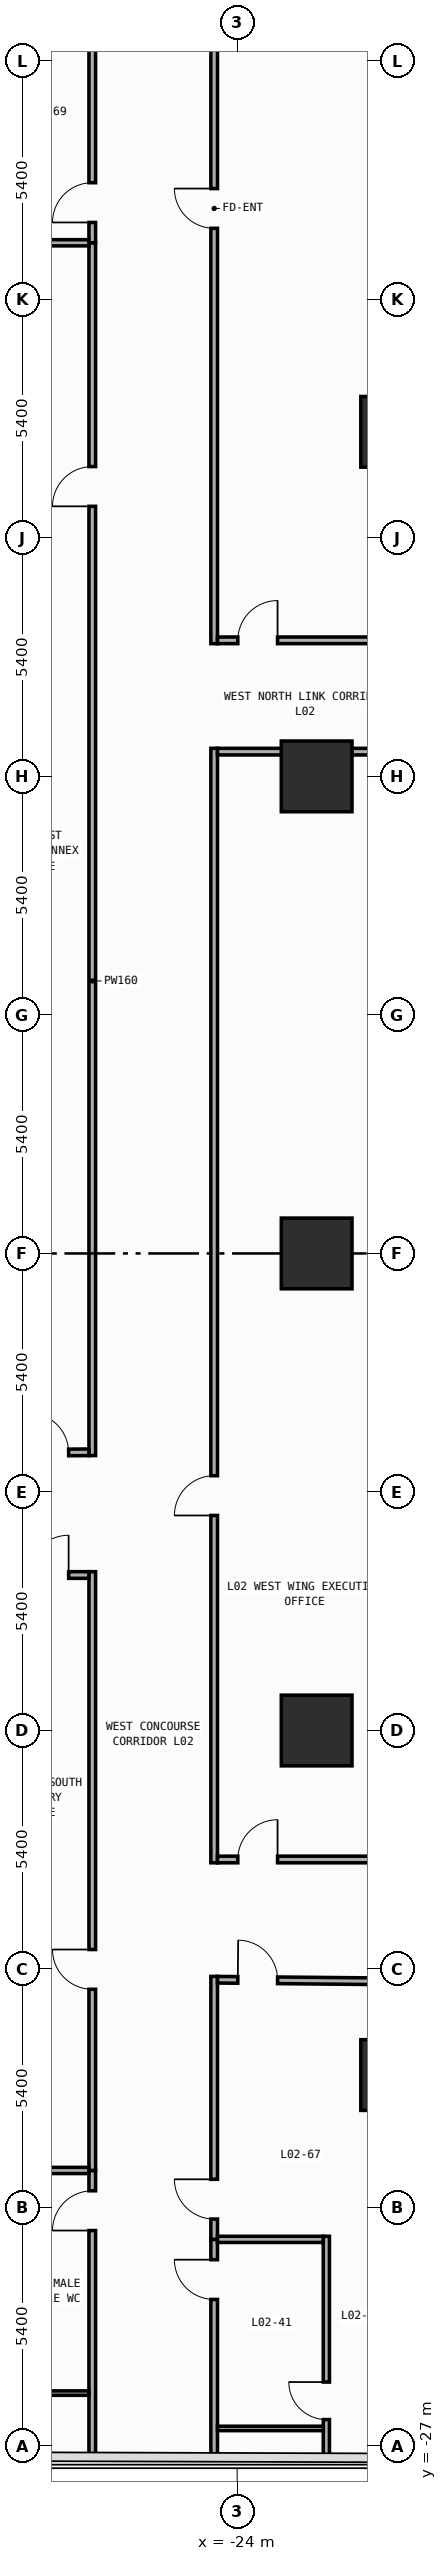
"""IFC4 building model, lengths in metres.
Left out: names, types, materials, properties, quantities, classifications, styles, units other than length and angle.
Written with IfcOpenShell. Run it as: python <this file> out.ifc"""

import sys

from ifc_helpers import new_model, si_unit, direction, frame, frame_2d, origin, origin_2d, place, context, subcontext, project, spatial, rectangle, extrude, element, fill, save


model = new_model("IFC4")
c1 = context("Model", 3, precision=1e-05, world=origin(), true_north=direction((0.0, 1.0)))
c2 = subcontext(c1, "Body", "Model", "MODEL_VIEW")
j1 = project(units=[si_unit("LENGTHUNIT", "METRE"), si_unit("PLANEANGLEUNIT", "RADIAN")], contexts=[c1])
p1 = place(None, origin())
s1 = spatial("IfcSite", under=j1, at=p1, CompositionType="ELEMENT")
p2 = place(p1, origin())
s2 = spatial("IfcBuilding", under=s1, at=p2, CompositionType="ELEMENT")
p3 = place(p2, frame((0.0, 0.0, 6.0)))
s3 = spatial("IfcBuildingStorey", under=s2, at=p3, CompositionType="ELEMENT", Elevation=6.0)
for number, where, z_axis, x_axis in (
    (1, (-20.4, -18.6, 0.0), (0.0, 0.0, 1.0), (1.0, 0.0, 0.0)),
    (2, (-20.4, 18.6, 0.0), (0.0, 0.0, 1.0), (1.0, 0.0, 0.0)),
    (3, (-22.2, -10.8, 0.0), (0.0, 0.0, 1.0), (1.0, 0.0, 0.0)),
    (4, (-22.2, 0.0, 0.0), (0.0, 0.0, 1.0), (1.0, 0.0, 0.0)),
    (5, (-22.2, 10.8, 0.0), (0.0, 0.0, 1.0), (1.0, 0.0, 0.0)),
):
    element("IfcColumn", number, at=place(p3, frame(where, z_axis=z_axis, x_axis=x_axis)), inside=s3, PredefinedType="COLUMN", context=c2, shape_type="SweptSolid", body=[
        extrude(rectangle(XDim=1.6, YDim=1.6, at=origin_2d()), origin(), (0.0, 0.0, 1.0), 5.0),
    ])
p4 = place(p3, frame((-24.52, 13.805, 0.0), z_axis=(0.0, 0.0, 1.0), x_axis=(0.0, 1.0, 0.0)))
e6 = element("IfcWall", 6, at=p4, inside=s3, PredefinedType="PARTITIONING", context=c2, shape_type="SweptSolid", body=[
    extrude(rectangle(XDim=13.608, YDim=0.15, at=frame_2d((6.804, 0.0))), origin(), (0.0, 0.0, 1.0), 4.7),
])
p5 = place(p4, frame((9.402, 0.0, 0.0)))
e7 = element("IfcOpeningElement", 7, at=p5, cuts=e6, PredefinedType="OPENING", context=c2, shape_type="SweptSolid", body=[
    extrude(rectangle(XDim=0.9, YDim=2.15, at=frame_2d((0.45, 1.075))), frame((0.0, 0.085, 0.0), z_axis=(0.0, -1.0, 0.0), x_axis=(1.0, 0.0, 0.0)), (0.0, 0.0, 1.0), 0.17),
])
p6 = place(p3, frame((-27.28, -27.249, 0.0), z_axis=(0.0, 0.0, 1.0), x_axis=(0.0, 1.0, 0.0)))
e8 = element("IfcWall", 8, at=p6, inside=s3, PredefinedType="PARTITIONING", context=c2, shape_type="SweptSolid", body=[
    extrude(rectangle(XDim=6.489, YDim=0.15, at=frame_2d((3.245, 0.0))), origin(), (0.0, 0.0, 1.0), 4.7),
])
p7 = place(p6, frame((5.129, 0.0, 0.0)))
e9 = element("IfcOpeningElement", 9, at=p7, cuts=e8, PredefinedType="OPENING", context=c2, shape_type="SweptSolid", body=[
    extrude(rectangle(XDim=0.9, YDim=2.15, at=frame_2d((0.45, 1.075))), frame((0.0, 0.085, 0.0), z_axis=(0.0, -1.0, 0.0), x_axis=(1.0, 0.0, 0.0)), (0.0, 0.0, 1.0), 0.17),
])
p8 = place(p3, frame((-24.52, -27.258, 0.0), z_axis=(0.0, 0.0, 1.0), x_axis=(0.0, 1.0, 0.0)))
e10 = element("IfcWall", 10, at=p8, inside=s3, PredefinedType="PARTITIONING", context=c2, shape_type="SweptSolid", body=[
    extrude(rectangle(XDim=4.938, YDim=0.15, at=frame_2d((2.469, 0.0))), origin(), (0.0, 0.0, 1.0), 4.7),
])
p9 = place(p8, frame((3.578, 0.0, 0.0)))
e11 = element("IfcOpeningElement", 11, at=p9, cuts=e10, PredefinedType="OPENING", context=c2, shape_type="SweptSolid", body=[
    extrude(rectangle(XDim=0.9, YDim=2.15, at=frame_2d((0.45, 1.075))), frame((0.0, 0.085, 0.0), z_axis=(0.0, -1.0, 0.0), x_axis=(1.0, 0.0, 0.0)), (0.0, 0.0, 1.0), 0.17),
])
p10 = place(p3, frame((-24.52, -13.795, 0.0), z_axis=(0.0, 0.0, 1.0), x_axis=(0.0, 1.0, 0.0)))
e12 = element("IfcWall", 12, at=p10, inside=s3, PredefinedType="PARTITIONING", context=c2, shape_type="SweptSolid", body=[
    extrude(rectangle(XDim=25.23, YDim=0.15, at=frame_2d((12.615, 0.0))), origin(), (0.0, 0.0, 1.0), 4.7),
])
p11 = place(p10, frame((7.863, 0.0, 0.0)))
e13 = element("IfcOpeningElement", 13, at=p11, cuts=e12, PredefinedType="OPENING", context=c2, shape_type="SweptSolid", body=[
    extrude(rectangle(XDim=0.9, YDim=2.15, at=frame_2d((0.45, 1.075))), frame((0.0, 0.085, 0.0), z_axis=(0.0, -1.0, 0.0), x_axis=(1.0, 0.0, 0.0)), (0.0, 0.0, 1.0), 0.17),
])
p12 = place(p3, frame((-27.28, -20.76, 0.0), z_axis=(0.0, 0.0, 1.0), x_axis=(0.0, 1.0, 0.0)))
e14 = element("IfcWall", 14, at=p12, inside=s3, PredefinedType="PARTITIONING", context=c2, shape_type="SweptSolid", body=[
    extrude(rectangle(XDim=13.555, YDim=0.15, at=frame_2d((6.777, 0.0))), origin(), (0.0, 0.0, 1.0), 4.7),
])
p13 = place(p12, frame((4.102, 0.0, 0.0)))
e15 = element("IfcOpeningElement", 15, at=p13, cuts=e14, PredefinedType="OPENING", context=c2, shape_type="SweptSolid", body=[
    extrude(rectangle(XDim=0.9, YDim=2.15, at=frame_2d((0.45, 1.075))), frame((0.0, 0.085, 0.0), z_axis=(0.0, -1.0, 0.0), x_axis=(1.0, 0.0, 0.0)), (0.0, 0.0, 1.0), 0.17),
])
p14 = place(p3, frame((-27.28, -4.576, 0.0), z_axis=(0.0, 0.0, 1.0), x_axis=(0.0, 1.0, 0.0)))
e16 = element("IfcWall", 16, at=p14, inside=s3, PredefinedType="PARTITIONING", context=c2, shape_type="SweptSolid", body=[
    extrude(rectangle(XDim=27.456, YDim=0.15, at=frame_2d((13.728, 0.0))), origin(), (0.0, 0.0, 1.0), 4.7),
])
p15 = place(p14, frame((21.49, 0.0, 0.0)))
e17 = element("IfcOpeningElement", 17, at=p15, cuts=e16, PredefinedType="OPENING", context=c2, shape_type="SweptSolid", body=[
    extrude(rectangle(XDim=0.9, YDim=2.15, at=frame_2d((0.45, 1.075))), frame((0.0, 0.085, 0.0), z_axis=(0.0, -1.0, 0.0), x_axis=(1.0, 0.0, 0.0)), (0.0, 0.0, 1.0), 0.17),
])
p16 = place(p3, frame((-24.52, -22.32, 0.0), z_axis=(0.0, 0.0, 1.0), x_axis=(0.0, 1.0, 0.0)))
e18 = element("IfcWall", 18, at=p16, inside=s3, PredefinedType="PARTITIONING", context=c2, shape_type="SweptSolid", body=[
    extrude(rectangle(XDim=5.954, YDim=0.15, at=frame_2d((2.977, 0.0))), origin(), (0.0, 0.0, 1.0), 4.7),
])
p17 = place(p16, frame((0.46, 0.0, 0.0)))
e19 = element("IfcOpeningElement", 19, at=p17, cuts=e18, PredefinedType="OPENING", context=c2, shape_type="SweptSolid", body=[
    extrude(rectangle(XDim=0.9, YDim=2.15, at=frame_2d((0.45, 1.075))), frame((0.0, 0.085, 0.0), z_axis=(0.0, -1.0, 0.0), x_axis=(1.0, 0.0, 0.0)), (0.0, 0.0, 1.0), 0.17),
])
p18 = place(p3, frame((-27.28, 22.88, 0.0), z_axis=(0.0, 0.0, 1.0), x_axis=(0.0, 1.0, 0.0)))
e20 = element("IfcWall", 20, at=p18, inside=s3, PredefinedType="PARTITIONING", context=c2, shape_type="SweptSolid", body=[
    extrude(rectangle(XDim=4.542, YDim=0.15, at=frame_2d((2.271, 0.0))), origin(), (0.0, 0.0, 1.0), 4.7),
])
p19 = place(p18, frame((0.46, 0.0, 0.0)))
e21 = element("IfcOpeningElement", 21, at=p19, cuts=e20, PredefinedType="OPENING", context=c2, shape_type="SweptSolid", body=[
    extrude(rectangle(XDim=0.9, YDim=2.15, at=frame_2d((0.45, 1.075))), frame((0.0, 0.085, 0.0), z_axis=(0.0, -1.0, 0.0), x_axis=(1.0, 0.0, 0.0)), (0.0, 0.0, 1.0), 0.17),
])
p20 = place(p3, frame((-24.445, -13.72, 0.0), z_axis=(0.0, 0.0, 1.0), x_axis=(1.0, 0.0, 0.0)))
e22 = element("IfcWall", 22, at=p20, inside=s3, PredefinedType="PARTITIONING", context=c2, shape_type="SweptSolid", body=[
    extrude(rectangle(XDim=4.135, YDim=0.15, at=frame_2d((2.067, 0.0))), origin(), (0.0, 0.0, 1.0), 4.7),
])
p21 = place(p20, frame((0.46, 0.0, 0.0)))
e23 = element("IfcOpeningElement", 23, at=p21, cuts=e22, PredefinedType="OPENING", context=c2, shape_type="SweptSolid", body=[
    extrude(rectangle(XDim=0.9, YDim=2.15, at=frame_2d((0.45, 1.075))), frame((0.0, 0.085, 0.0), z_axis=(0.0, -1.0, 0.0), x_axis=(1.0, 0.0, 0.0)), (0.0, 0.0, 1.0), 0.17),
])
p22 = place(p3, frame((-24.445, -16.442, 0.0), z_axis=(0.0, 0.0, 1.0), x_axis=(0.999954573497, -0.009531576096, 0.0)))
e24 = element("IfcWall", 24, at=p22, inside=s3, PredefinedType="PARTITIONING", context=c2, shape_type="SweptSolid", body=[
    extrude(rectangle(XDim=3.97, YDim=0.15, at=frame_2d((1.985, 0.0))), origin(), (0.0, 0.0, 1.0), 4.7),
])
p23 = place(p22, frame((0.46, 0.0, 0.0)))
e25 = element("IfcOpeningElement", 25, at=p23, cuts=e24, PredefinedType="OPENING", context=c2, shape_type="SweptSolid", body=[
    extrude(rectangle(XDim=0.9, YDim=2.15, at=frame_2d((0.45, 1.075))), frame((0.0, 0.085, 0.0), z_axis=(0.0, -1.0, 0.0), x_axis=(1.0, 0.0, 0.0)), (0.0, 0.0, 1.0), 0.17),
])
p24 = place(p3, frame((-24.445, 13.88, 0.0), z_axis=(0.0, 0.0, 1.0), x_axis=(1.0, 0.0, 0.0)))
e26 = element("IfcWall", 26, at=p24, inside=s3, PredefinedType="PARTITIONING", context=c2, shape_type="SweptSolid", body=[
    extrude(rectangle(XDim=10.165, YDim=0.15, at=frame_2d((5.083, 0.0))), origin(), (0.0, 0.0, 1.0), 4.7),
])
p25 = place(p24, frame((0.46, 0.0, 0.0)))
e27 = element("IfcOpeningElement", 27, at=p25, cuts=e26, PredefinedType="OPENING", context=c2, shape_type="SweptSolid", body=[
    extrude(rectangle(XDim=0.9, YDim=2.15, at=frame_2d((0.45, 1.075))), frame((0.0, 0.085, 0.0), z_axis=(0.0, -1.0, 0.0), x_axis=(1.0, 0.0, 0.0)), (0.0, 0.0, 1.0), 0.17),
])
p26 = place(p3, frame((-24.445, 11.36, 0.0), z_axis=(0.0, 0.0, 1.0), x_axis=(1.0, 0.0, 0.0)))
e28 = element("IfcWall", 28, at=p26, inside=s3, PredefinedType="PARTITIONING", context=c2, shape_type="SweptSolid", body=[
    extrude(rectangle(XDim=4.045, YDim=0.15, at=frame_2d((2.022, 0.0))), origin(), (0.0, 0.0, 1.0), 4.7),
])
p27 = place(p3, frame((-30.04, -7.28, 0.0), z_axis=(0.0, 0.0, 1.0), x_axis=(1.0, 0.0, 0.0)))
e29 = element("IfcWall", 29, at=p27, inside=s3, PredefinedType="PARTITIONING", context=c2, shape_type="SweptSolid", body=[
    extrude(rectangle(XDim=2.685, YDim=0.15, at=frame_2d((1.343, 0.0))), origin(), (0.0, 0.0, 1.0), 4.7),
])
p28 = place(p27, frame((1.325, 0.0, 0.0)))
e30 = element("IfcOpeningElement", 30, at=p28, cuts=e29, PredefinedType="OPENING", context=c2, shape_type="SweptSolid", body=[
    extrude(rectangle(XDim=0.9, YDim=2.15, at=frame_2d((0.45, 1.075))), frame((0.0, 0.085, 0.0), z_axis=(0.0, -1.0, 0.0), x_axis=(1.0, 0.0, 0.0)), (0.0, 0.0, 1.0), 0.17),
])
p29 = place(p3, frame((-29.88, -4.52, 0.0), z_axis=(0.0, 0.0, 1.0), x_axis=(0.999973705414, 0.007251791521, 0.0)))
e31 = element("IfcWall", 31, at=p29, inside=s3, PredefinedType="PARTITIONING", context=c2, shape_type="SweptSolid", body=[
    extrude(rectangle(XDim=2.525, YDim=0.15, at=frame_2d((1.262, 0.0))), origin(), (0.0, 0.0, 1.0), 4.7),
])
p30 = place(p29, frame((1.165, 0.0, 0.0)))
e32 = element("IfcOpeningElement", 32, at=p30, cuts=e31, PredefinedType="OPENING", context=c2, shape_type="SweptSolid", body=[
    extrude(rectangle(XDim=0.9, YDim=2.15, at=frame_2d((0.45, 1.075))), frame((0.0, 0.085, 0.0), z_axis=(0.0, -1.0, 0.0), x_axis=(1.0, 0.0, 0.0)), (0.0, 0.0, 1.0), 0.17),
])
p31 = place(p3, frame((-29.81, -20.76, 0.0), z_axis=(0.0, 0.0, 1.0), x_axis=(1.0, 0.0, 0.0)))
e33 = element("IfcWall", 33, at=p31, inside=s3, PredefinedType="PARTITIONING", context=c2, shape_type="SweptSolid", body=[
    extrude(rectangle(XDim=2.455, YDim=0.14, at=frame_2d((1.228, 0.0))), origin(), (0.0, 0.0, 1.0), 4.7),
])
p32 = place(p3, frame((-21.98, -27.266, 0.0), z_axis=(0.0, 0.0, 1.0), x_axis=(0.0, 1.0, 0.0)))
e34 = element("IfcWall", 34, at=p32, inside=s3, PredefinedType="PARTITIONING", context=c2, shape_type="SweptSolid", body=[
    extrude(rectangle(XDim=5.016, YDim=0.14, at=frame_2d((2.508, 0.0))), origin(), (0.0, 0.0, 1.0), 4.7),
])
p33 = place(p32, frame((0.866, 0.0, 0.0)))
e35 = element("IfcOpeningElement", 35, at=p33, cuts=e34, PredefinedType="OPENING", context=c2, shape_type="SweptSolid", body=[
    extrude(rectangle(XDim=0.85, YDim=2.1, at=frame_2d((0.425, 1.05))), frame((0.0, 0.08, 0.0), z_axis=(0.0, -1.0, 0.0), x_axis=(1.0, 0.0, 0.0)), (0.0, 0.0, 1.0), 0.16),
])
p34 = place(p3, frame((-24.445, -22.32, 0.0), z_axis=(0.0, 0.0, 1.0), x_axis=(1.0, 0.0, 0.0)))
e36 = element("IfcWall", 36, at=p34, inside=s3, PredefinedType="PARTITIONING", context=c2, shape_type="SweptSolid", body=[
    extrude(rectangle(XDim=2.395, YDim=0.14, at=frame_2d((1.198, 0.0))), origin(), (0.0, 0.0, 1.0), 4.7),
])
p35 = place(p3, frame((-29.81, 22.88, 0.0), z_axis=(0.0, 0.0, 1.0), x_axis=(1.0, 0.0, 0.0)))
e37 = element("IfcWall", 37, at=p35, inside=s3, PredefinedType="PARTITIONING", context=c2, shape_type="SweptSolid", body=[
    extrude(rectangle(XDim=2.455, YDim=0.14, at=frame_2d((1.228, 0.0))), origin(), (0.0, 0.0, 1.0), 4.7),
])
p36 = place(p3, frame((-27.355, -25.8, 0.0), z_axis=(0.0, 0.0, 1.0), x_axis=(-1.0, 0.0, 0.0)))
e38 = element("IfcWall", 38, at=p36, inside=s3, PredefinedType="PARTITIONING", context=c2, shape_type="SweptSolid", body=[
    extrude(rectangle(XDim=2.455, YDim=0.1, at=frame_2d((1.228, 0.0))), origin(), (0.0, 0.0, 1.0), 4.7),
])
p37 = place(p3, frame((-22.05, -26.6, 0.0), z_axis=(0.0, 0.0, 1.0), x_axis=(-1.0, 0.0, 0.0)))
e39 = element("IfcWall", 39, at=p37, inside=s3, PredefinedType="PARTITIONING", context=c2, shape_type="SweptSolid", body=[
    extrude(rectangle(XDim=2.395, YDim=0.1, at=frame_2d((1.198, 0.0))), origin(), (0.0, 0.0, 1.0), 4.7),
])
p38 = place(p5, origin())
e40 = element("IfcDoor", 40, at=p38, inside=s3, OperationType="SINGLE_SWING_RIGHT", PredefinedType="DOOR", context=c2, shape_type="SweptSolid", body=[
    extrude(rectangle(XDim=0.9, YDim=2.15, at=frame_2d((0.45, 1.075))), frame((0.0, 0.025, 0.0), z_axis=(0.0, -1.0, 0.0), x_axis=(1.0, 0.0, 0.0)), (0.0, 0.0, 1.0), 0.05),
])
fill(e7, e40)
p39 = place(p7, origin())
e41 = element("IfcDoor", 41, at=p39, inside=s3, OperationType="SINGLE_SWING_LEFT", PredefinedType="DOOR", context=c2, shape_type="SweptSolid", body=[
    extrude(rectangle(XDim=0.9, YDim=2.15, at=frame_2d((0.45, 1.075))), frame((0.0, 0.025, 0.0), z_axis=(0.0, -1.0, 0.0), x_axis=(1.0, 0.0, 0.0)), (0.0, 0.0, 1.0), 0.05),
])
fill(e9, e41)
p40 = place(p9, origin())
e42 = element("IfcDoor", 42, at=p40, inside=s3, OperationType="SINGLE_SWING_RIGHT", PredefinedType="DOOR", context=c2, shape_type="SweptSolid", body=[
    extrude(rectangle(XDim=0.9, YDim=2.15, at=frame_2d((0.45, 1.075))), frame((0.0, 0.025, 0.0), z_axis=(0.0, -1.0, 0.0), x_axis=(1.0, 0.0, 0.0)), (0.0, 0.0, 1.0), 0.05),
])
fill(e11, e42)
p41 = place(p11, origin())
e43 = element("IfcDoor", 43, at=p41, inside=s3, OperationType="SINGLE_SWING_LEFT", PredefinedType="DOOR", context=c2, shape_type="SweptSolid", body=[
    extrude(rectangle(XDim=0.9, YDim=2.15, at=frame_2d((0.45, 1.075))), frame((0.0, 0.025, 0.0), z_axis=(0.0, -1.0, 0.0), x_axis=(1.0, 0.0, 0.0)), (0.0, 0.0, 1.0), 0.05),
])
fill(e13, e43)
p42 = place(p13, origin())
e44 = element("IfcDoor", 44, at=p42, inside=s3, OperationType="SINGLE_SWING_RIGHT", PredefinedType="DOOR", context=c2, shape_type="SweptSolid", body=[
    extrude(rectangle(XDim=0.9, YDim=2.15, at=frame_2d((0.45, 1.075))), frame((0.0, 0.025, 0.0), z_axis=(0.0, -1.0, 0.0), x_axis=(1.0, 0.0, 0.0)), (0.0, 0.0, 1.0), 0.05),
])
fill(e15, e44)
p43 = place(p15, origin())
e45 = element("IfcDoor", 45, at=p43, inside=s3, OperationType="SINGLE_SWING_LEFT", PredefinedType="DOOR", context=c2, shape_type="SweptSolid", body=[
    extrude(rectangle(XDim=0.9, YDim=2.15, at=frame_2d((0.45, 1.075))), frame((0.0, 0.025, 0.0), z_axis=(0.0, -1.0, 0.0), x_axis=(1.0, 0.0, 0.0)), (0.0, 0.0, 1.0), 0.05),
])
fill(e17, e45)
p44 = place(p17, origin())
e46 = element("IfcDoor", 46, at=p44, inside=s3, OperationType="SINGLE_SWING_RIGHT", PredefinedType="DOOR", context=c2, shape_type="SweptSolid", body=[
    extrude(rectangle(XDim=0.9, YDim=2.15, at=frame_2d((0.45, 1.075))), frame((0.0, 0.025, 0.0), z_axis=(0.0, -1.0, 0.0), x_axis=(1.0, 0.0, 0.0)), (0.0, 0.0, 1.0), 0.05),
])
fill(e19, e46)
p45 = place(p19, origin())
e47 = element("IfcDoor", 47, at=p45, inside=s3, OperationType="SINGLE_SWING_LEFT", PredefinedType="DOOR", context=c2, shape_type="SweptSolid", body=[
    extrude(rectangle(XDim=0.9, YDim=2.15, at=frame_2d((0.45, 1.075))), frame((0.0, 0.025, 0.0), z_axis=(0.0, -1.0, 0.0), x_axis=(1.0, 0.0, 0.0)), (0.0, 0.0, 1.0), 0.05),
])
fill(e21, e47)
p46 = place(p21, origin())
e48 = element("IfcDoor", 48, at=p46, inside=s3, OperationType="SINGLE_SWING_RIGHT", PredefinedType="DOOR", context=c2, shape_type="SweptSolid", body=[
    extrude(rectangle(XDim=0.9, YDim=2.15, at=frame_2d((0.45, 1.075))), frame((0.0, 0.025, 0.0), z_axis=(0.0, -1.0, 0.0), x_axis=(1.0, 0.0, 0.0)), (0.0, 0.0, 1.0), 0.05),
])
fill(e23, e48)
p47 = place(p23, origin())
e49 = element("IfcDoor", 49, at=p47, inside=s3, OperationType="SINGLE_SWING_LEFT", PredefinedType="DOOR", context=c2, shape_type="SweptSolid", body=[
    extrude(rectangle(XDim=0.9, YDim=2.15, at=frame_2d((0.45, 1.075))), frame((0.0, 0.025, 0.0), z_axis=(0.0, -1.0, 0.0), x_axis=(1.0, 0.0, 0.0)), (0.0, 0.0, 1.0), 0.05),
])
fill(e25, e49)
p48 = place(p25, origin())
e50 = element("IfcDoor", 50, at=p48, inside=s3, OperationType="SINGLE_SWING_RIGHT", PredefinedType="DOOR", context=c2, shape_type="SweptSolid", body=[
    extrude(rectangle(XDim=0.9, YDim=2.15, at=frame_2d((0.45, 1.075))), frame((0.0, 0.025, 0.0), z_axis=(0.0, -1.0, 0.0), x_axis=(1.0, 0.0, 0.0)), (0.0, 0.0, 1.0), 0.05),
])
fill(e27, e50)
p49 = place(p28, origin())
e51 = element("IfcDoor", 51, at=p49, inside=s3, OperationType="SINGLE_SWING_RIGHT", PredefinedType="DOOR", context=c2, shape_type="SweptSolid", body=[
    extrude(rectangle(XDim=0.9, YDim=2.15, at=frame_2d((0.45, 1.075))), frame((0.0, 0.025, 0.0), z_axis=(0.0, -1.0, 0.0), x_axis=(1.0, 0.0, 0.0)), (0.0, 0.0, 1.0), 0.05),
])
fill(e30, e51)
p50 = place(p30, origin())
e52 = element("IfcDoor", 52, at=p50, inside=s3, OperationType="SINGLE_SWING_LEFT", PredefinedType="DOOR", context=c2, shape_type="SweptSolid", body=[
    extrude(rectangle(XDim=0.9, YDim=2.15, at=frame_2d((0.45, 1.075))), frame((0.0, 0.025, 0.0), z_axis=(0.0, -1.0, 0.0), x_axis=(1.0, 0.0, 0.0)), (0.0, 0.0, 1.0), 0.05),
])
fill(e32, e52)
p51 = place(p33, origin())
e53 = element("IfcDoor", 53, at=p51, inside=s3, OperationType="SINGLE_SWING_RIGHT", PredefinedType="DOOR", context=c2, shape_type="SweptSolid", body=[
    extrude(rectangle(XDim=0.85, YDim=2.1, at=frame_2d((0.425, 1.05))), frame((0.0, 0.025, 0.0), z_axis=(0.0, -1.0, 0.0), x_axis=(1.0, 0.0, 0.0)), (0.0, 0.0, 1.0), 0.05),
])
fill(e35, e53)
save(model, sys.argv[1])
